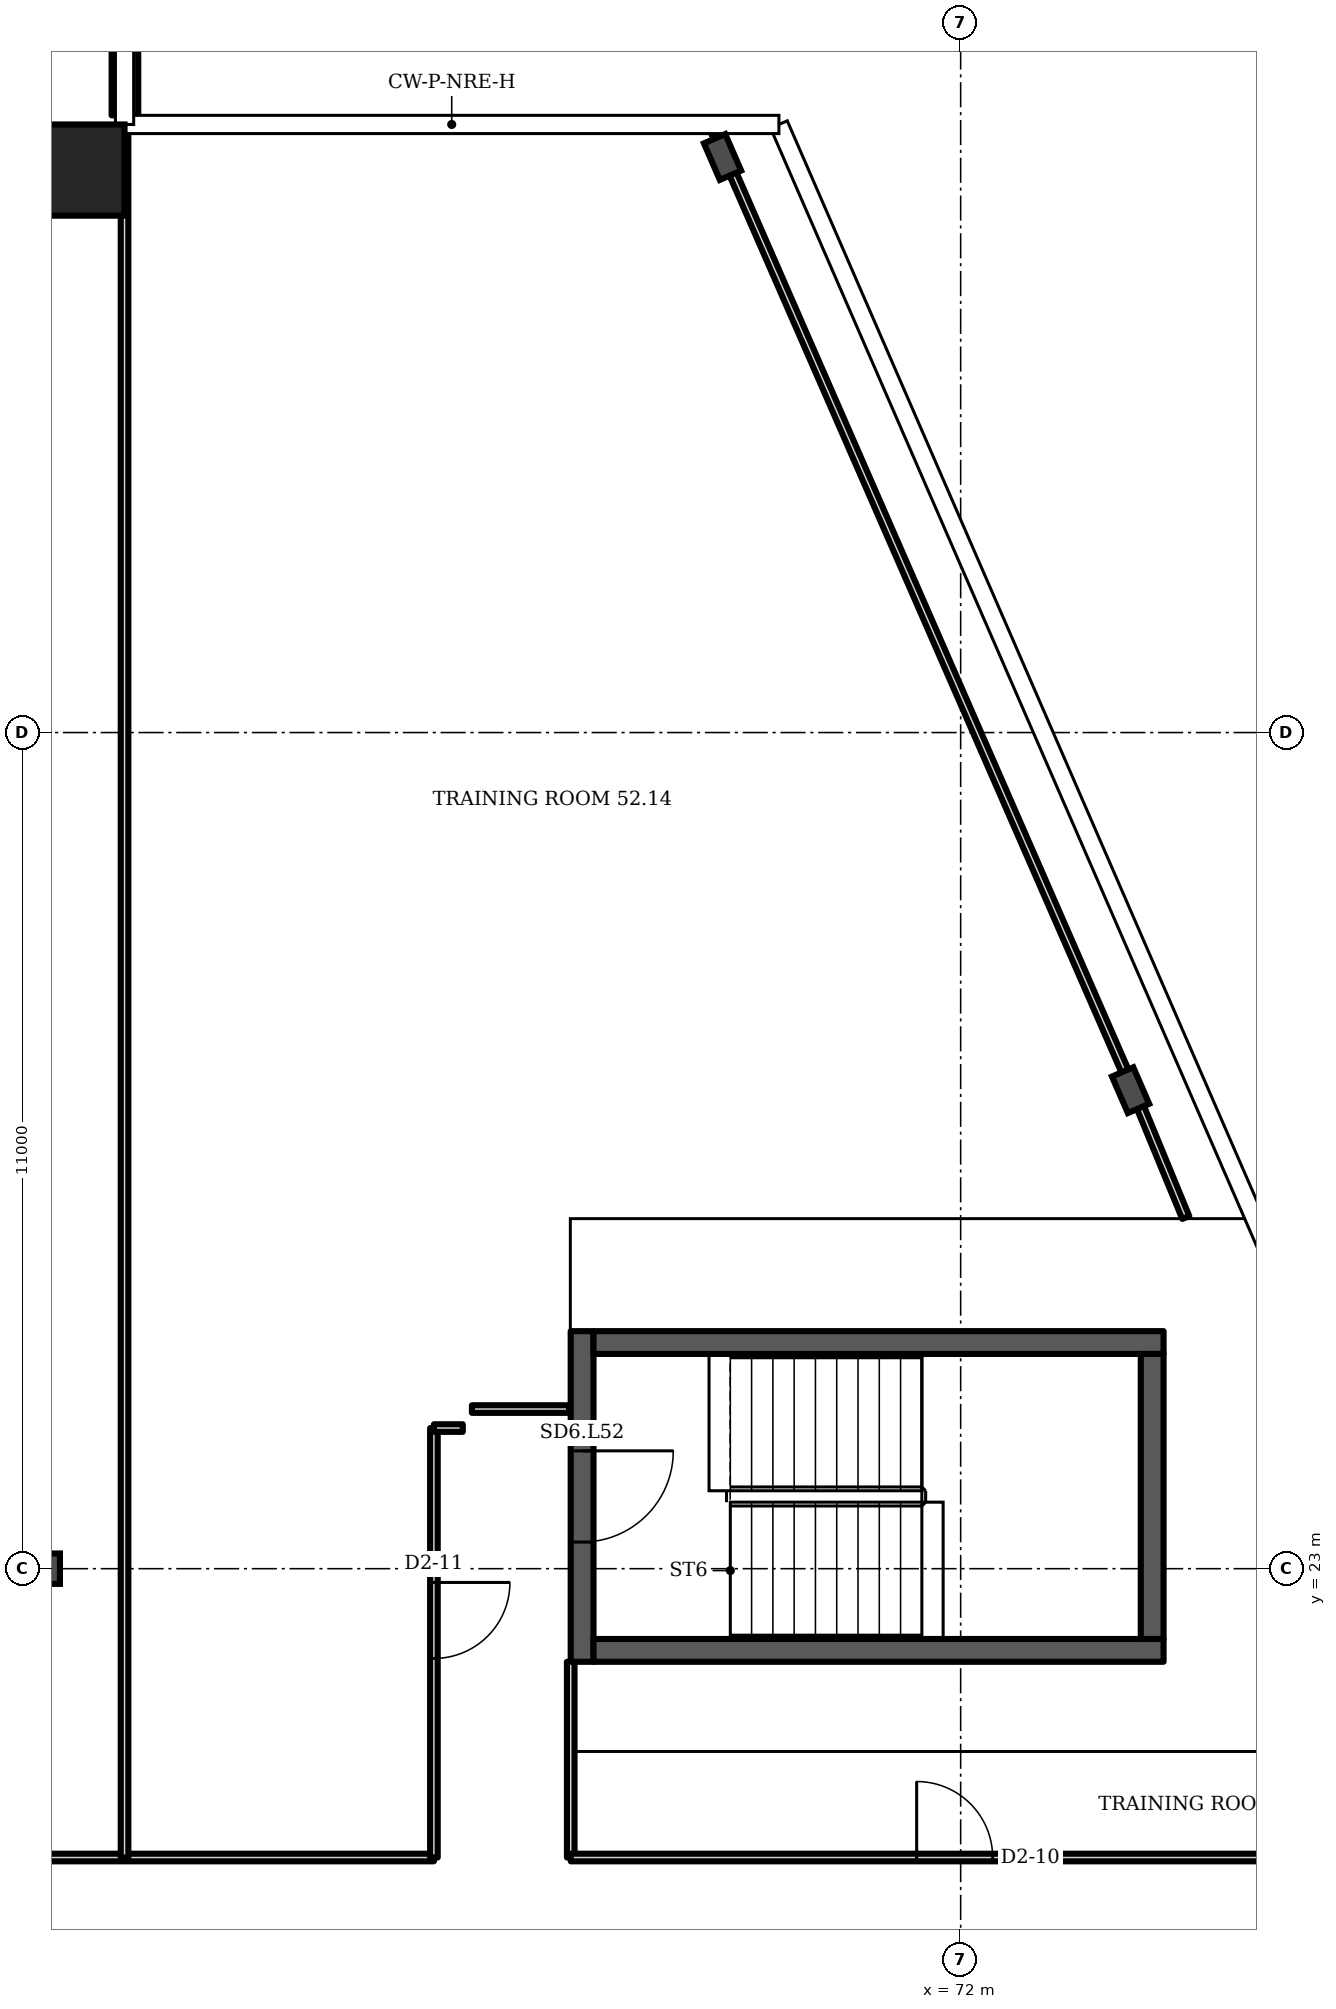
"""IFC4 building model, lengths in metres.
Left out: names, types, materials, properties, quantities, classifications, styles, units other than length and angle.
Written with IfcOpenShell. Run it as: python <this file> out.ifc"""

import sys

from ifc_helpers import new_model, si_unit, direction, frame, frame_2d, origin, origin_2d, place, context, subcontext, project, spatial, rectangle, i_section, extrude, element, fill, save


model = new_model("IFC4")
c1 = context("Model", 3, precision=1e-05, world=origin(), true_north=direction((0.0, 1.0)))
c2 = subcontext(c1, "Body", "Model", "MODEL_VIEW")
j1 = project(units=[si_unit("LENGTHUNIT", "METRE"), si_unit("PLANEANGLEUNIT", "RADIAN")], contexts=[c1])
p1 = place(None, origin())
s1 = spatial("IfcSite", under=j1, at=p1, CompositionType="ELEMENT")
p2 = place(p1, origin())
s2 = spatial("IfcBuilding", under=s1, at=p2, CompositionType="ELEMENT")
p3 = place(p2, frame((0.0, 0.0, 210.7)))
s3 = spatial("IfcBuildingStorey", under=s2, at=p3, CompositionType="ELEMENT", Elevation=210.7)
p4 = place(p3, frame((60.4, 41.4, 0.0), z_axis=(0.0, 0.0, 1.0), x_axis=(1.0, 0.0, 0.0)))
e1 = element("IfcColumn", 1, at=p4, inside=s3, PredefinedType="COLUMN", context=c2, shape_type="SweptSolid", body=[
    extrude(rectangle(XDim=1.2, YDim=1.2, at=origin_2d()), origin(), (0.0, 0.0, 1.0), 3.6),
])
for number, where, z_axis, x_axis in (
    (2, (74.235, 29.295, 0.0), (0.0, 0.0, 1.0), (0.917, 0.399, 0.0)),
    (3, (68.867, 41.572, 0.0), (0.0, 0.0, 1.0), (0.917, 0.399, 0.0)),
):
    element("IfcColumn", number, at=place(p3, frame(where, z_axis=z_axis, x_axis=x_axis)), inside=s3, PredefinedType="COLUMN", context=c2, shape_type="SweptSolid", body=[
        extrude(i_section(OverallWidth=0.306, OverallDepth=0.524, WebThickness=0.021, FlangeThickness=0.04, FilletRadius=0.027, at=origin_2d()), origin(), (0.0, 0.0, 1.0), 3.6),
    ])
p5 = place(p3, frame((60.0, 23.0, 0.0), z_axis=(0.0, 0.0, 1.0), x_axis=(1.0, 0.0, 0.0)))
e4 = element("IfcColumn", 4, at=p5, inside=s3, PredefinedType="COLUMN", context=c2, shape_type="SweptSolid", body=[
    extrude(i_section(OverallWidth=0.3, OverallDepth=0.4, WebThickness=0.013, FlangeThickness=0.024, FilletRadius=0.027, at=origin_2d()), origin(), (0.0, 0.0, 1.0), 3.6),
])
p6 = place(p3, frame((61.005, 42.12, 0.0), z_axis=(0.0, 0.0, 1.0), x_axis=(0.0, 1.0, 0.0)))
e5 = element("IfcWall", 5, at=p6, inside=s3, PredefinedType="SOLIDWALL", context=c2, shape_type="SweptSolid", body=[
    extrude(rectangle(XDim=6.006, YDim=0.35, at=frame_2d((3.003, 0.0))), origin(), (0.0, 0.0, 1.0), 1.0),
])
p7 = place(p3, frame((67.02, 21.775, 0.0), z_axis=(0.0, 0.0, 1.0), x_axis=(0.0, 1.0, 0.0)))
e6 = element("IfcWall", 6, at=p7, inside=s3, PredefinedType="SHEAR", context=c2, shape_type="SweptSolid", body=[
    extrude(rectangle(XDim=4.35, YDim=0.3, at=frame_2d((2.175, 0.0))), origin(), (0.0, 0.0, 1.0), 3.2),
])
p8 = place(p7, frame((1.575, 0.0, 0.0)))
e7 = element("IfcOpeningElement", 7, at=p8, cuts=e6, PredefinedType="OPENING", context=c2, shape_type="SweptSolid", body=[
    extrude(rectangle(XDim=1.2, YDim=2.1, at=frame_2d((0.6, 1.05))), frame((0.0, 0.16, 0.0), z_axis=(0.0, -1.0, 0.0), x_axis=(1.0, 0.0, 0.0)), (0.0, 0.0, 1.0), 0.32),
])
p9 = place(p3, frame((47.36, 19.2, 0.0), z_axis=(0.0, 0.0, 1.0), x_axis=(1.0, 0.0, 0.0)))
e8 = element("IfcWall", 8, at=p9, inside=s3, PredefinedType="PARTITIONING", context=c2, shape_type="SweptSolid", body=[
    extrude(rectangle(XDim=17.71, YDim=0.1, at=frame_2d((8.855, 0.0))), origin(), (0.0, 0.0, 1.0), 3.2),
])
p10 = place(p3, frame((61.0, 19.2, 0.0), z_axis=(0.0, 0.0, 1.0), x_axis=(0.0, 1.0, 0.0)))
e9 = element("IfcWall", 9, at=p10, inside=s3, PredefinedType="PARTITIONING", context=c2, shape_type="SweptSolid", body=[
    extrude(rectangle(XDim=22.78, YDim=0.1, at=frame_2d((11.39, 0.0))), origin(), (0.0, 0.0, 1.0), 3.2),
])
p11 = place(p3, frame((65.07, 19.2, 0.0), z_axis=(0.0, 0.0, 1.0), x_axis=(0.0, 1.0, 0.0)))
e10 = element("IfcWall", 10, at=p11, inside=s3, PredefinedType="PARTITIONING", context=c2, shape_type="SweptSolid", body=[
    extrude(rectangle(XDim=5.65, YDim=0.1, at=frame_2d((2.825, 0.0))), origin(), (0.0, 0.0, 1.0), 3.2),
])
p12 = place(p11, frame((2.619, 0.0, 0.0)))
e11 = element("IfcOpeningElement", 11, at=p12, cuts=e10, PredefinedType="OPENING", context=c2, shape_type="SweptSolid", body=[
    extrude(rectangle(XDim=1.0, YDim=2.1, at=frame_2d((0.5, 1.05))), frame((0.0, 0.06, 0.0), z_axis=(0.0, -1.0, 0.0), x_axis=(1.0, 0.0, 0.0)), (0.0, 0.0, 1.0), 0.12),
])
p13 = place(p3, frame((65.07, 24.85, 0.0), z_axis=(0.0, 0.0, 1.0), x_axis=(1.0, 0.0, 0.0)))
e12 = element("IfcWall", 12, at=p13, inside=s3, PredefinedType="PARTITIONING", context=c2, shape_type="SweptSolid", body=[
    extrude(rectangle(XDim=0.38, YDim=0.1, at=frame_2d((0.19, 0.0))), origin(), (0.0, 0.0, 1.0), 3.2),
])
p14 = place(p3, frame((65.57, 25.1, 0.0), z_axis=(0.0, 0.0, 1.0), x_axis=(1.0, 0.0, 0.0)))
e13 = element("IfcWall", 13, at=p14, inside=s3, PredefinedType="PARTITIONING", context=c2, shape_type="SweptSolid", body=[
    extrude(rectangle(XDim=1.28, YDim=0.1, at=frame_2d((0.64, 0.0))), origin(), (0.0, 0.0, 1.0), 3.2),
])
p15 = place(p3, frame((66.87, 19.2, 0.0), z_axis=(0.0, 0.0, 1.0), x_axis=(0.0, 1.0, 0.0)))
e14 = element("IfcWall", 14, at=p15, inside=s3, PredefinedType="PARTITIONING", context=c2, shape_type="SweptSolid", body=[
    extrude(rectangle(XDim=2.575, YDim=0.1, at=frame_2d((1.288, 0.0))), origin(), (0.0, 0.0, 1.0), 3.2),
])
p16 = place(p3, frame((66.87, 19.2, 0.0), z_axis=(0.0, 0.0, 1.0), x_axis=(1.0, 0.0, 0.0)))
e15 = element("IfcWall", 15, at=p16, inside=s3, PredefinedType="PARTITIONING", context=c2, shape_type="SweptSolid", body=[
    extrude(rectangle(XDim=11.57, YDim=0.1, at=frame_2d((5.785, 0.0))), origin(), (0.0, 0.0, 1.0), 3.2),
])
p17 = place(p16, frame((4.551, 0.0, 0.0)))
e16 = element("IfcOpeningElement", 16, at=p17, cuts=e15, PredefinedType="OPENING", context=c2, shape_type="SweptSolid", body=[
    extrude(rectangle(XDim=1.0, YDim=2.1, at=frame_2d((0.5, 1.05))), frame((0.0, 0.06, 0.0), z_axis=(0.0, -1.0, 0.0), x_axis=(1.0, 0.0, 0.0)), (0.0, 0.0, 1.0), 0.12),
])
p18 = place(p3, frame((74.265, 29.31, 0.0), z_axis=(0.0, 0.0, 1.0), x_axis=(-0.400401, 0.916335, 0.0)))
e17 = element("IfcWall", 17, at=p18, inside=s3, PredefinedType="PARTITIONING", context=c2, shape_type="SweptSolid", body=[
    extrude(rectangle(XDim=13.795, YDim=0.1, at=frame_2d((6.897, 0.0))), origin(), (0.0, 0.0, 1.0), 2.58),
])
p19 = place(p3, frame((74.962, 27.62, 0.0), z_axis=(0.0, 0.0, 1.0), x_axis=(-0.381293, 0.924452, 0.0)))
e18 = element("IfcWall", 18, at=p19, inside=s3, PredefinedType="PARTITIONING", context=c2, shape_type="SweptSolid", body=[
    extrude(rectangle(XDim=1.828, YDim=0.1, at=frame_2d((0.914, 0.0))), origin(), (0.0, 0.0, 1.0), 2.58),
])
for number, where, z_axis, x_axis in (
    (19, (67.17, 21.925, 0.0), (0.0, 0.0, 1.0), (1.0, 0.0, 0.0)),
    (20, (67.17, 25.975, 0.0), (0.0, 0.0, 1.0), (1.0, 0.0, 0.0)),
):
    element("IfcWall", number, at=place(p3, frame(where, z_axis=z_axis, x_axis=x_axis)), inside=s3, PredefinedType="SHEAR", context=c2, shape_type="SweptSolid", body=[
        extrude(rectangle(XDim=7.5, YDim=0.3, at=frame_2d((3.75, 0.0))), origin(), (0.0, 0.0, 1.0), 3.2),
    ])
p20 = place(p3, frame((74.52, 22.075, 0.0), z_axis=(0.0, 0.0, 1.0), x_axis=(0.0, 1.0, 0.0)))
e21 = element("IfcWall", 21, at=p20, inside=s3, PredefinedType="SHEAR", context=c2, shape_type="SweptSolid", body=[
    extrude(rectangle(XDim=3.75, YDim=0.3, at=frame_2d((1.875, 0.0))), origin(), (0.0, 0.0, 1.0), 3.2),
])
p21 = place(p8, origin())
e22 = element("IfcDoor", 22, at=p21, inside=s3, OperationType="SINGLE_SWING_RIGHT", PredefinedType="DOOR", context=c2, shape_type="SweptSolid", body=[
    extrude(rectangle(XDim=1.2, YDim=2.1, at=frame_2d((0.6, 1.05))), frame((0.0, 0.025, 0.0), z_axis=(0.0, -1.0, 0.0), x_axis=(1.0, 0.0, 0.0)), (0.0, 0.0, 1.0), 0.05),
])
fill(e7, e22)
p22 = place(p17, origin())
e23 = element("IfcDoor", 23, at=p22, inside=s3, OperationType="SINGLE_SWING_LEFT", PredefinedType="DOOR", context=c2, shape_type="SweptSolid", body=[
    extrude(rectangle(XDim=1.0, YDim=2.1, at=frame_2d((0.5, 1.05))), frame((0.0, 0.025, 0.0), z_axis=(0.0, -1.0, 0.0), x_axis=(1.0, 0.0, 0.0)), (0.0, 0.0, 1.0), 0.05),
])
fill(e16, e23)
p23 = place(p12, origin())
e24 = element("IfcDoor", 24, at=p23, inside=s3, OperationType="SINGLE_SWING_RIGHT", PredefinedType="DOOR", context=c2, shape_type="SweptSolid", body=[
    extrude(rectangle(XDim=1.0, YDim=2.1, at=frame_2d((0.5, 1.05))), frame((0.0, 0.025, 0.0), z_axis=(0.0, -1.0, 0.0), x_axis=(1.0, 0.0, 0.0)), (0.0, 0.0, 1.0), 0.05),
])
fill(e11, e24)
save(model, sys.argv[1])
